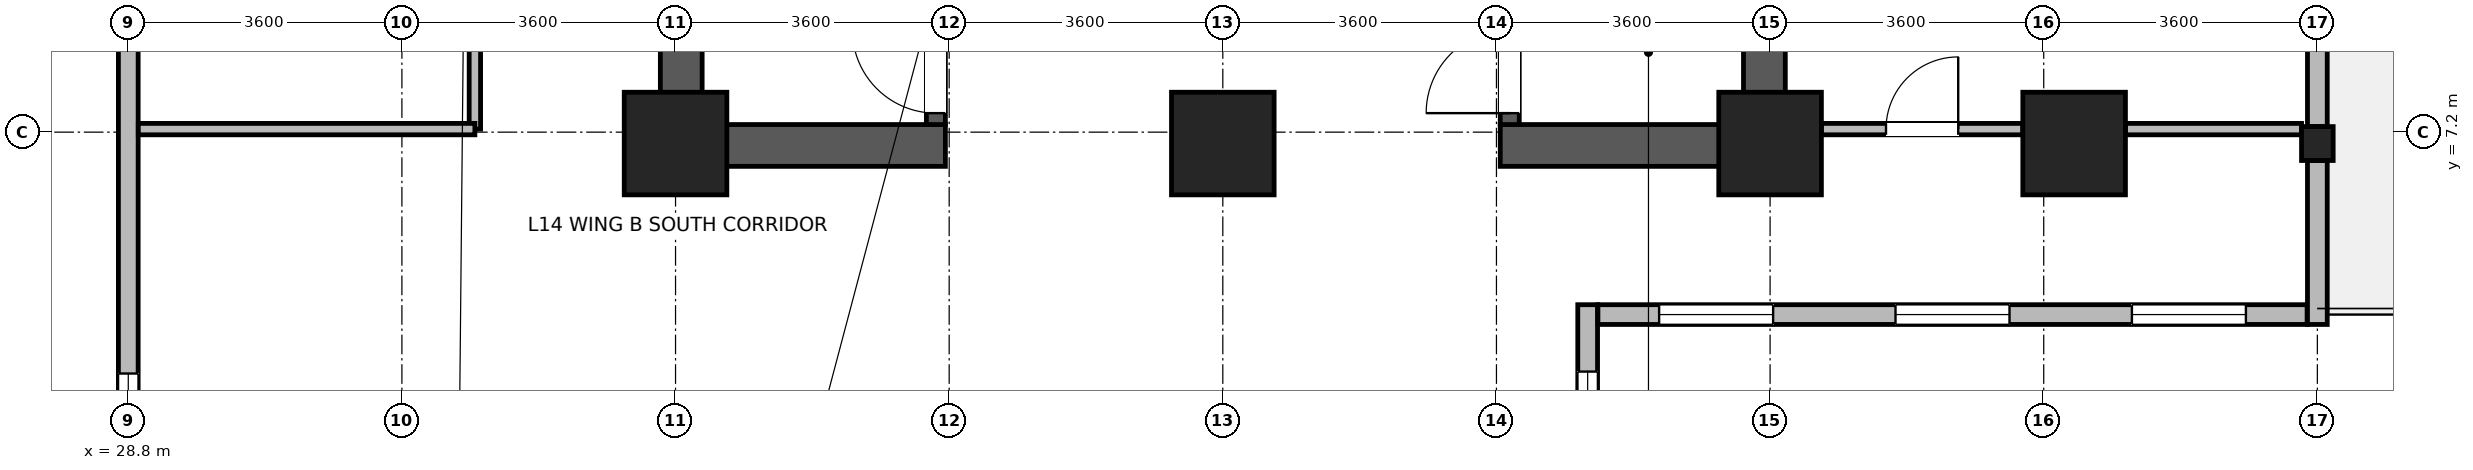
"""IFC4 building model, lengths in metres.
Left out: names, types, materials, properties, quantities, classifications, styles, units other than length and angle.
Written with IfcOpenShell. Run it as: python <this file> out.ifc"""

import sys

from ifc_helpers import new_model, si_unit, direction, frame, frame_2d, origin, origin_2d, place, context, subcontext, project, spatial, rectangle, i_section, extrude, source, transform, mapped, element, fill, save


model = new_model("IFC4")
c1 = context("Model", 3, precision=1e-05, world=origin(), true_north=direction((0.0, 1.0)))
c2 = subcontext(c1, "Body", "Model", "MODEL_VIEW")
j1 = project(units=[si_unit("LENGTHUNIT", "METRE"), si_unit("PLANEANGLEUNIT", "RADIAN")], contexts=[c1])
p1 = place(None, origin())
s1 = spatial("IfcSite", under=j1, at=p1, CompositionType="ELEMENT")
p2 = place(p1, origin())
s2 = spatial("IfcBuilding", under=s1, at=p2, CompositionType="ELEMENT")
p3 = place(p2, frame((0.0, 0.0, 58.6)))
s3 = spatial("IfcBuildingStorey", under=s2, at=p3, CompositionType="ELEMENT", Elevation=58.6)
for number, where, z_axis, x_axis in (
    (1, (36.075, 6.75, 0.0), (0.0, 0.0, 1.0), (0.0, 1.0, 0.0)),
    (2, (50.325, 6.75, 0.0), (0.0, 0.0, 1.0), (0.0, 1.0, 0.0)),
):
    element("IfcWall", number, at=place(p3, frame(where, z_axis=z_axis, x_axis=x_axis)), inside=s3, PredefinedType="SHEAR", context=c2, shape_type="SweptSolid", body=[
        extrude(rectangle(XDim=8.1, YDim=0.55, at=frame_2d((4.05, 0.0))), origin(), (0.0, 0.0, 1.0), 3.45),
    ])
for number, where, z_axis, x_axis in (
    (3, (36.35, 7.025, 0.0), (0.0, 0.0, 1.0), (1.0, 0.0, 0.0)),
    (4, (46.85, 7.025, 0.0), (0.0, 0.0, 1.0), (1.0, 0.0, 0.0)),
):
    element("IfcWall", number, at=place(p3, frame(where, z_axis=z_axis, x_axis=x_axis)), inside=s3, PredefinedType="SHEAR", context=c2, shape_type="SweptSolid", body=[
        extrude(rectangle(XDim=3.2, YDim=0.55, at=frame_2d((1.6, 0.0))), origin(), (0.0, 0.0, 1.0), 3.45),
    ])
p4 = place(p3, frame((39.425, 7.3, 0.0), z_axis=(0.0, 0.0, 1.0), x_axis=(0.0, 1.0, 0.0)))
e5 = element("IfcWall", 5, at=p4, inside=s3, PredefinedType="SHEAR", context=c2, shape_type="SweptSolid", body=[
    extrude(rectangle(XDim=7.0, YDim=0.25, at=frame_2d((3.5, 0.0))), origin(), (0.0, 0.0, 1.0), 3.45),
])
p5 = place(p4, frame((0.15, 0.0, 0.0)))
e6 = element("IfcOpeningElement", 6, at=p5, cuts=e5, PredefinedType="OPENING", context=c2, shape_type="SweptSolid", body=[
    extrude(rectangle(XDim=1.1, YDim=2.08, at=frame_2d((0.55, 1.04))), frame((0.0, 0.135, 0.0), z_axis=(0.0, -1.0, 0.0), x_axis=(1.0, 0.0, 0.0)), (0.0, 0.0, 1.0), 0.27),
])
p6 = place(p3, frame((46.975, 7.3, 0.0), z_axis=(0.0, 0.0, 1.0), x_axis=(0.0, 1.0, 0.0)))
e7 = element("IfcWall", 7, at=p6, inside=s3, PredefinedType="SHEAR", context=c2, shape_type="SweptSolid", body=[
    extrude(rectangle(XDim=7.0, YDim=0.25, at=frame_2d((3.5, 0.0))), origin(), (0.0, 0.0, 1.0), 3.45),
])
p7 = place(p6, frame((0.15, 0.0, 0.0)))
e8 = element("IfcOpeningElement", 8, at=p7, cuts=e7, PredefinedType="OPENING", context=c2, shape_type="SweptSolid", body=[
    extrude(rectangle(XDim=1.1, YDim=2.08, at=frame_2d((0.55, 1.04))), frame((0.0, 0.135, 0.0), z_axis=(0.0, -1.0, 0.0), x_axis=(1.0, 0.0, 0.0)), (0.0, 0.0, 1.0), 0.27),
])
m1 = source(origin(), c2, "Body", "SweptSolid", [
    extrude(rectangle(XDim=1.35, YDim=1.35, at=origin_2d()), origin(), (0.0, 0.0, 1.0), 3.7),
])
for number, where, z_axis, x_axis in (
    (9, (36.0, 7.05, 0.0), (0.0, 0.0, 1.0), (1.0, 0.0, 0.0)),
    (10, (43.2, 7.05, 0.0), (0.0, 0.0, 1.0), (1.0, 0.0, 0.0)),
    (11, (50.4, 7.05, 0.0), (0.0, 0.0, 1.0), (1.0, 0.0, 0.0)),
    (12, (54.4, 7.05, 0.0), (0.0, 0.0, 1.0), (1.0, 0.0, 0.0)),
):
    element("IfcColumn", number, at=place(p3, frame(where, z_axis=z_axis, x_axis=x_axis)), inside=s3, PredefinedType="COLUMN", context=c2, shape_type="MappedRepresentation", body=[
        mapped(m1, transform((0.0, 0.0, 0.0), x_axis=(1.0, 0.0, 0.0), y_axis=(0.0, 1.0, 0.0), z_axis=(0.0, 0.0, 1.0), scale=1.0)),
    ])
m2 = source(origin(), c2, "Body", "SweptSolid", [
    extrude(i_section(OverallWidth=0.416, OverallDepth=0.446, WebThickness=0.029, FlangeThickness=0.04, FilletRadius=0.015, at=origin_2d()), origin(), (0.0, 0.0, 1.0), 3.7),
])
p8 = place(p3, frame((57.6, 7.05, 0.0), z_axis=(0.0, 0.0, 1.0), x_axis=(1.0, 0.0, 0.0)))
e13 = element("IfcColumn", 13, at=p8, inside=s3, PredefinedType="COLUMN", context=c2, shape_type="MappedRepresentation", body=[
    mapped(m2, transform((0.0, 0.0, 0.0), x_axis=(1.0, 0.0, 0.0), y_axis=(0.0, 1.0, 0.0), z_axis=(0.0, 0.0, 1.0), scale=1.0)),
])
p9 = place(p3, frame((48.0, 4.93, 0.0), z_axis=(0.0, 0.0, 1.0), x_axis=(0.0, -1.0, 0.0)))
e14 = element("IfcWall", 14, at=p9, inside=s3, PredefinedType="STANDARD", context=c2, shape_type="SweptSolid", body=[
    extrude(rectangle(XDim=3.26, YDim=0.26, at=frame_2d((1.63, 0.0))), origin(), (0.0, 0.0, 1.0), 3.43),
])
p10 = place(p9, frame((0.88, 0.0, 0.85)))
e15 = element("IfcOpeningElement", 15, at=p10, cuts=e14, PredefinedType="OPENING", context=c2, shape_type="SweptSolid", body=[
    extrude(rectangle(XDim=1.5, YDim=1.85, at=frame_2d((0.75, 0.925))), frame((0.0, 0.14, 0.0), z_axis=(0.0, -1.0, 0.0), x_axis=(1.0, 0.0, 0.0)), (0.0, 0.0, 1.0), 0.28),
])
p11 = place(p3, frame((57.465, 4.8, 0.0), z_axis=(0.0, 0.0, 1.0), x_axis=(-1.0, 0.0, 0.0)))
e16 = element("IfcWall", 16, at=p11, inside=s3, PredefinedType="STANDARD", context=c2, shape_type="SweptSolid", body=[
    extrude(rectangle(XDim=9.33, YDim=0.26, at=frame_2d((4.665, 0.0))), origin(), (0.0, 0.0, 1.0), 3.43),
])
p12 = place(p11, frame((0.805, 0.0, 0.85)))
e17 = element("IfcOpeningElement", 17, at=p12, cuts=e16, PredefinedType="OPENING", context=c2, shape_type="SweptSolid", body=[
    extrude(rectangle(XDim=1.5, YDim=1.85, at=frame_2d((0.75, 0.925))), frame((0.0, 0.14, 0.0), z_axis=(0.0, -1.0, 0.0), x_axis=(1.0, 0.0, 0.0)), (0.0, 0.0, 1.0), 0.28),
])
p13 = place(p11, frame((3.915, 0.0, 0.85)))
e18 = element("IfcOpeningElement", 18, at=p13, cuts=e16, PredefinedType="OPENING", context=c2, shape_type="SweptSolid", body=[
    extrude(rectangle(XDim=1.5, YDim=1.85, at=frame_2d((0.75, 0.925))), frame((0.0, 0.14, 0.0), z_axis=(0.0, -1.0, 0.0), x_axis=(1.0, 0.0, 0.0)), (0.0, 0.0, 1.0), 0.28),
])
p14 = place(p11, frame((7.025, 0.0, 0.85)))
e19 = element("IfcOpeningElement", 19, at=p14, cuts=e16, PredefinedType="OPENING", context=c2, shape_type="SweptSolid", body=[
    extrude(rectangle(XDim=1.5, YDim=1.85, at=frame_2d((0.75, 0.925))), frame((0.0, 0.14, 0.0), z_axis=(0.0, -1.0, 0.0), x_axis=(1.0, 0.0, 0.0)), (0.0, 0.0, 1.0), 0.28),
])
p15 = place(p3, frame((57.6, 6.826, 0.0), z_axis=(0.0, 0.0, 1.0), x_axis=(0.0, -1.0, 0.0)))
e20 = element("IfcWall", 20, at=p15, inside=s3, PredefinedType="STANDARD", context=c2, shape_type="SweptSolid", body=[
    extrude(rectangle(XDim=2.156, YDim=0.26, at=frame_2d((1.078, 0.0))), origin(), (0.0, 0.0, 1.0), 3.43),
])
p16 = place(p3, frame((57.6, 14.326, 0.0), z_axis=(0.0, 0.0, 1.0), x_axis=(0.0, -1.0, 0.0)))
e21 = element("IfcWall", 21, at=p16, inside=s3, PredefinedType="STANDARD", context=c2, shape_type="SweptSolid", body=[
    extrude(rectangle(XDim=7.052, YDim=0.26, at=frame_2d((3.526, 0.0))), origin(), (0.0, 0.0, 1.0), 2.93),
])
p17 = place(p16, frame((2.776, 0.0, 0.0)))
e22 = element("IfcOpeningElement", 22, at=p17, cuts=e21, PredefinedType="OPENING", context=c2, shape_type="SweptSolid", body=[
    extrude(rectangle(XDim=1.5, YDim=2.15, at=frame_2d((0.75, 1.075))), frame((0.0, 0.14, 0.0), z_axis=(0.0, -1.0, 0.0), x_axis=(1.0, 0.0, 0.0)), (0.0, 0.0, 1.0), 0.28),
])
p18 = place(p16, frame((1.013, 0.0, 0.85)))
e23 = element("IfcOpeningElement", 23, at=p18, cuts=e21, PredefinedType="OPENING", context=c2, shape_type="SweptSolid", body=[
    extrude(rectangle(XDim=1.5, YDim=1.85, at=frame_2d((0.75, 0.925))), frame((0.0, 0.14, 0.0), z_axis=(0.0, -1.0, 0.0), x_axis=(1.0, 0.0, 0.0)), (0.0, 0.0, 1.0), 0.28),
])
p19 = place(p16, frame((4.539, 0.0, 0.85)))
e24 = element("IfcOpeningElement", 24, at=p19, cuts=e21, PredefinedType="OPENING", context=c2, shape_type="SweptSolid", body=[
    extrude(rectangle(XDim=1.5, YDim=1.85, at=frame_2d((0.75, 0.925))), frame((0.0, 0.14, 0.0), z_axis=(0.0, -1.0, 0.0), x_axis=(1.0, 0.0, 0.0)), (0.0, 0.0, 1.0), 0.28),
])
p20 = place(p3, frame((28.8, 1.67, 0.0), z_axis=(0.0, 0.0, 1.0), x_axis=(0.0, 1.0, 0.0)))
e25 = element("IfcWall", 25, at=p20, inside=s3, PredefinedType="STANDARD", context=c2, shape_type="SweptSolid", body=[
    extrude(rectangle(XDim=19.254, YDim=0.26, at=frame_2d((9.627, 0.0))), origin(), (0.0, 0.0, 1.0), 3.43),
])
p21 = place(p20, frame((0.854, 0.0, 0.85)))
e26 = element("IfcOpeningElement", 26, at=p21, cuts=e25, PredefinedType="OPENING", context=c2, shape_type="SweptSolid", body=[
    extrude(rectangle(XDim=1.5, YDim=1.85, at=frame_2d((0.75, 0.925))), frame((0.0, 0.14, 0.0), z_axis=(0.0, -1.0, 0.0), x_axis=(1.0, 0.0, 0.0)), (0.0, 0.0, 1.0), 0.28),
])
p22 = place(p20, frame((7.272, 0.0, 0.85)))
e27 = element("IfcOpeningElement", 27, at=p22, cuts=e25, PredefinedType="OPENING", context=c2, shape_type="SweptSolid", body=[
    extrude(rectangle(XDim=1.5, YDim=1.85, at=frame_2d((0.75, 0.925))), frame((0.0, 0.14, 0.0), z_axis=(0.0, -1.0, 0.0), x_axis=(1.0, 0.0, 0.0)), (0.0, 0.0, 1.0), 0.28),
])
p23 = place(p20, frame((10.481, 0.0, 0.85)))
e28 = element("IfcOpeningElement", 28, at=p23, cuts=e25, PredefinedType="OPENING", context=c2, shape_type="SweptSolid", body=[
    extrude(rectangle(XDim=1.5, YDim=1.85, at=frame_2d((0.75, 0.925))), frame((0.0, 0.14, 0.0), z_axis=(0.0, -1.0, 0.0), x_axis=(1.0, 0.0, 0.0)), (0.0, 0.0, 1.0), 0.28),
])
p24 = place(p20, frame((13.69, 0.0, 0.85)))
e29 = element("IfcOpeningElement", 29, at=p24, cuts=e25, PredefinedType="OPENING", context=c2, shape_type="SweptSolid", body=[
    extrude(rectangle(XDim=1.5, YDim=1.85, at=frame_2d((0.75, 0.925))), frame((0.0, 0.14, 0.0), z_axis=(0.0, -1.0, 0.0), x_axis=(1.0, 0.0, 0.0)), (0.0, 0.0, 1.0), 0.28),
])
p25 = place(p20, frame((16.899, 0.0, 0.85)))
e30 = element("IfcOpeningElement", 30, at=p25, cuts=e25, PredefinedType="OPENING", context=c2, shape_type="SweptSolid", body=[
    extrude(rectangle(XDim=1.5, YDim=1.85, at=frame_2d((0.75, 0.925))), frame((0.0, 0.14, 0.0), z_axis=(0.0, -1.0, 0.0), x_axis=(1.0, 0.0, 0.0)), (0.0, 0.0, 1.0), 0.28),
])
p26 = place(p3, frame((33.36, 7.24, 0.0), z_axis=(0.0, 0.0, 1.0), x_axis=(0.0, 1.0, 0.0)))
e31 = element("IfcWall", 31, at=p26, inside=s3, PredefinedType="PARTITIONING", context=c2, shape_type="SweptSolid", body=[
    extrude(rectangle(XDim=7.26, YDim=0.15, at=frame_2d((3.63, 0.0))), origin(), (0.0, 0.0, 1.0), 3.43),
])
p27 = place(p26, frame((2.98, 0.0, 0.0)))
e32 = element("IfcOpeningElement", 32, at=p27, cuts=e31, PredefinedType="OPENING", context=c2, shape_type="SweptSolid", body=[
    extrude(rectangle(XDim=1.3, YDim=2.12, at=frame_2d((0.65, 1.06))), frame((0.0, 0.085, 0.0), z_axis=(0.0, -1.0, 0.0), x_axis=(1.0, 0.0, 0.0)), (0.0, 0.0, 1.0), 0.17),
])
p28 = place(p3, frame((51.075, 7.24, 0.0), z_axis=(0.0, 0.0, 1.0), x_axis=(1.0, 0.0, 0.0)))
e33 = element("IfcWall", 33, at=p28, inside=s3, PredefinedType="PARTITIONING", context=c2, shape_type="SweptSolid", body=[
    extrude(rectangle(XDim=2.65, YDim=0.15, at=frame_2d((1.325, 0.0))), origin(), (0.0, 0.0, 1.0), 2.78),
])
p29 = place(p28, frame((0.85, 0.0, 0.0)))
e34 = element("IfcOpeningElement", 34, at=p29, cuts=e33, PredefinedType="OPENING", context=c2, shape_type="SweptSolid", body=[
    extrude(rectangle(XDim=0.95, YDim=2.1, at=frame_2d((0.475, 1.05))), frame((0.0, 0.085, 0.0), z_axis=(0.0, -1.0, 0.0), x_axis=(1.0, 0.0, 0.0)), (0.0, 0.0, 1.0), 0.17),
])
p30 = place(p3, frame((55.075, 7.24, 0.0), z_axis=(0.0, 0.0, 1.0), x_axis=(1.0, 0.0, 0.0)))
e35 = element("IfcWall", 35, at=p30, inside=s3, PredefinedType="PARTITIONING", context=c2, shape_type="SweptSolid", body=[
    extrude(rectangle(XDim=2.317, YDim=0.15, at=frame_2d((1.159, 0.0))), origin(), (0.0, 0.0, 1.0), 2.78),
])
p31 = place(p3, frame((28.932, 7.24, 0.0), z_axis=(0.0, 0.0, 1.0), x_axis=(1.0, 0.0, 0.0)))
e36 = element("IfcWall", 36, at=p31, inside=s3, PredefinedType="PARTITIONING", context=c2, shape_type="SweptSolid", body=[
    extrude(rectangle(XDim=4.428, YDim=0.15, at=frame_2d((2.214, 0.0))), origin(), (0.0, 0.0, 1.0), 3.43),
])
p32 = place(p10, origin())
e37 = element("IfcWindow", 37, at=p32, inside=s3, PartitioningType="SINGLE_PANEL", PredefinedType="WINDOW", context=c2, shape_type="SweptSolid", body=[
    extrude(rectangle(XDim=1.5, YDim=1.85, at=frame_2d((0.75, 0.925))), frame((0.0, 0.03, 0.0), z_axis=(0.0, -1.0, 0.0), x_axis=(1.0, 0.0, 0.0)), (0.0, 0.0, 1.0), 0.06),
])
fill(e15, e37)
p33 = place(p12, origin())
e38 = element("IfcWindow", 38, at=p33, inside=s3, PartitioningType="SINGLE_PANEL", PredefinedType="WINDOW", context=c2, shape_type="SweptSolid", body=[
    extrude(rectangle(XDim=1.5, YDim=1.85, at=frame_2d((0.75, 0.925))), frame((0.0, 0.03, 0.0), z_axis=(0.0, -1.0, 0.0), x_axis=(1.0, 0.0, 0.0)), (0.0, 0.0, 1.0), 0.06),
])
fill(e17, e38)
p34 = place(p13, origin())
e39 = element("IfcWindow", 39, at=p34, inside=s3, PartitioningType="SINGLE_PANEL", PredefinedType="WINDOW", context=c2, shape_type="SweptSolid", body=[
    extrude(rectangle(XDim=1.5, YDim=1.85, at=frame_2d((0.75, 0.925))), frame((0.0, 0.03, 0.0), z_axis=(0.0, -1.0, 0.0), x_axis=(1.0, 0.0, 0.0)), (0.0, 0.0, 1.0), 0.06),
])
fill(e18, e39)
p35 = place(p14, origin())
e40 = element("IfcWindow", 40, at=p35, inside=s3, PartitioningType="SINGLE_PANEL", PredefinedType="WINDOW", context=c2, shape_type="SweptSolid", body=[
    extrude(rectangle(XDim=1.5, YDim=1.85, at=frame_2d((0.75, 0.925))), frame((0.0, 0.03, 0.0), z_axis=(0.0, -1.0, 0.0), x_axis=(1.0, 0.0, 0.0)), (0.0, 0.0, 1.0), 0.06),
])
fill(e19, e40)
p36 = place(p21, origin())
e41 = element("IfcWindow", 41, at=p36, inside=s3, PartitioningType="SINGLE_PANEL", PredefinedType="WINDOW", context=c2, shape_type="SweptSolid", body=[
    extrude(rectangle(XDim=1.5, YDim=1.85, at=frame_2d((0.75, 0.925))), frame((0.0, 0.03, 0.0), z_axis=(0.0, -1.0, 0.0), x_axis=(1.0, 0.0, 0.0)), (0.0, 0.0, 1.0), 0.06),
])
fill(e26, e41)
p37 = place(p5, origin())
e42 = element("IfcDoor", 42, at=p37, inside=s3, OperationType="SINGLE_SWING_RIGHT", PredefinedType="DOOR", context=c2, shape_type="SweptSolid", body=[
    extrude(rectangle(XDim=1.1, YDim=2.08, at=frame_2d((0.55, 1.04))), frame((0.0, 0.025, 0.0), z_axis=(0.0, -1.0, 0.0), x_axis=(1.0, 0.0, 0.0)), (0.0, 0.0, 1.0), 0.05),
])
fill(e6, e42)
p38 = place(p7, origin())
e43 = element("IfcDoor", 43, at=p38, inside=s3, OperationType="SINGLE_SWING_LEFT", PredefinedType="DOOR", context=c2, shape_type="SweptSolid", body=[
    extrude(rectangle(XDim=1.1, YDim=2.08, at=frame_2d((0.55, 1.04))), frame((0.0, 0.025, 0.0), z_axis=(0.0, -1.0, 0.0), x_axis=(1.0, 0.0, 0.0)), (0.0, 0.0, 1.0), 0.05),
])
fill(e8, e43)
p39 = place(p29, origin())
e44 = element("IfcDoor", 44, at=p39, inside=s3, OperationType="SINGLE_SWING_RIGHT", PredefinedType="DOOR", context=c2, shape_type="SweptSolid", body=[
    extrude(rectangle(XDim=0.95, YDim=2.1, at=frame_2d((0.475, 1.05))), frame((0.0, 0.025, 0.0), z_axis=(0.0, -1.0, 0.0), x_axis=(1.0, 0.0, 0.0)), (0.0, 0.0, 1.0), 0.05),
])
fill(e34, e44)
save(model, sys.argv[1])
